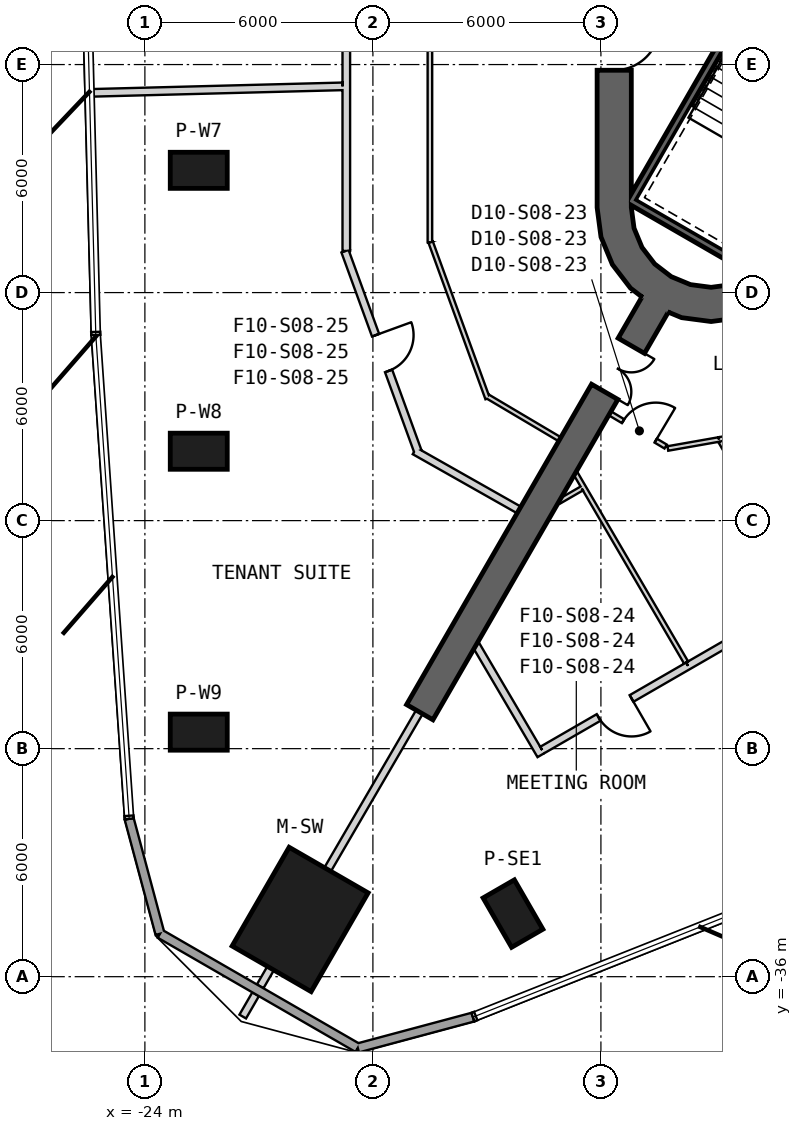
"""IFC4 building model, lengths in metres.
Left out: names, types, materials, properties, quantities, classifications, styles, units other than length and angle.
Written with IfcOpenShell. Run it as: python <this file> out.ifc"""

import sys

from ifc_helpers import new_model, si_unit, direction, frame, frame_2d, origin, origin_2d, place, context, subcontext, project, spatial, polyline, rectangle, outline, extrude, element, fill, save


model = new_model("IFC4")
c1 = context("Model", 3, precision=1e-05, world=origin(), true_north=direction((0.0, 1.0)))
c2 = subcontext(c1, "Body", "Model", "MODEL_VIEW")
j1 = project(units=[si_unit("LENGTHUNIT", "METRE"), si_unit("PLANEANGLEUNIT", "RADIAN")], contexts=[c1])
p1 = place(None, origin())
s1 = spatial("IfcSite", under=j1, at=p1, CompositionType="ELEMENT")
p2 = place(p1, origin())
s2 = spatial("IfcBuilding", under=s1, at=p2, CompositionType="ELEMENT")
p3 = place(p2, frame((0.0, 0.0, 143.9)))
s3 = spatial("IfcBuildingStorey", under=s2, at=p3, CompositionType="ELEMENT", Elevation=143.9)
p4 = place(p3, frame((-19.915, -34.494, 0.0), z_axis=(0.0, 0.0, 1.0), x_axis=(-0.5, -0.866025403784, 0.0)))
e1 = element("IfcColumn", 1, at=p4, inside=s3, PredefinedType="COLUMN", context=c2, shape_type="SweptSolid", body=[
    extrude(rectangle(XDim=3.0, YDim=2.4, at=origin_2d()), origin(), (0.0, 0.0, 1.0), 4.1),
])
for number, where, z_axis, x_axis in (
    (2, (-22.583, -14.783, 0.0), (0.0, 0.0, 1.0), (-1.0, 0.0, 0.0)),
    (3, (-22.583, -22.174, 0.0), (0.0, 0.0, 1.0), (-1.0, 0.0, 0.0)),
    (4, (-22.583, -29.566, 0.0), (0.0, 0.0, 1.0), (-1.0, 0.0, 0.0)),
    (5, (-14.313, -34.34, 0.0), (0.0, 0.0, 1.0), (0.5, -0.866, 0.0)),
):
    element("IfcColumn", number, at=place(p3, frame(where, z_axis=z_axis, x_axis=x_axis)), inside=s3, PredefinedType="COLUMN", context=c2, shape_type="SweptSolid", body=[
        extrude(rectangle(XDim=1.5, YDim=0.95, at=origin_2d()), origin(), (0.0, 0.0, 1.0), 4.1),
    ])
p5 = place(p3, frame((-11.65, 15.762, 0.0), z_axis=(0.0, 0.0, 1.0), x_axis=(0.0, -1.0, 0.0)))
e6 = element("IfcWall", 6, at=p5, inside=s3, PredefinedType="SHEAR", context=c2, shape_type="SweptSolid", body=[
    extrude(rectangle(XDim=31.523, YDim=0.9, at=frame_2d((15.762, 0.0))), origin(), (0.0, 0.0, 1.0), 4.1),
])
p6 = place(p5, frame((7.062, 0.0, 0.0)))
e7 = element("IfcOpeningElement", 7, at=p6, cuts=e6, PredefinedType="OPENING", context=c2, shape_type="SweptSolid", body=[
    extrude(rectangle(XDim=1.2, YDim=2.4, at=frame_2d((0.6, 1.2))), frame((0.0, 0.46, 0.0), z_axis=(0.0, -1.0, 0.0), x_axis=(1.0, 0.0, 0.0)), (0.0, 0.0, 1.0), 0.92),
])
p7 = place(p5, frame((9.762, 0.0, 0.0)))
e8 = element("IfcOpeningElement", 8, at=p7, cuts=e6, PredefinedType="OPENING", context=c2, shape_type="SweptSolid", body=[
    extrude(rectangle(XDim=1.2, YDim=2.4, at=frame_2d((0.6, 1.2))), frame((0.0, 0.46, 0.0), z_axis=(0.0, -1.0, 0.0), x_axis=(1.0, 0.0, 0.0)), (0.0, 0.0, 1.0), 0.92),
])
p8 = place(p5, frame((12.462, 0.0, 0.0)))
e9 = element("IfcOpeningElement", 9, at=p8, cuts=e6, PredefinedType="OPENING", context=c2, shape_type="SweptSolid", body=[
    extrude(rectangle(XDim=1.2, YDim=2.4, at=frame_2d((0.6, 1.2))), frame((0.0, 0.46, 0.0), z_axis=(0.0, -1.0, 0.0), x_axis=(1.0, 0.0, 0.0)), (0.0, 0.0, 1.0), 0.92),
])
p9 = place(p5, frame((15.162, 0.0, 0.0)))
e10 = element("IfcOpeningElement", 10, at=p9, cuts=e6, PredefinedType="OPENING", context=c2, shape_type="SweptSolid", body=[
    extrude(rectangle(XDim=1.2, YDim=2.4, at=frame_2d((0.6, 1.2))), frame((0.0, 0.46, 0.0), z_axis=(0.0, -1.0, 0.0), x_axis=(1.0, 0.0, 0.0)), (0.0, 0.0, 1.0), 0.92),
])
p10 = place(p5, frame((17.862, 0.0, 0.0)))
e11 = element("IfcOpeningElement", 11, at=p10, cuts=e6, PredefinedType="OPENING", context=c2, shape_type="SweptSolid", body=[
    extrude(rectangle(XDim=1.2, YDim=2.4, at=frame_2d((0.6, 1.2))), frame((0.0, 0.46, 0.0), z_axis=(0.0, -1.0, 0.0), x_axis=(1.0, 0.0, 0.0)), (0.0, 0.0, 1.0), 0.92),
])
p11 = place(p5, frame((20.562, 0.0, 0.0)))
e12 = element("IfcOpeningElement", 12, at=p11, cuts=e6, PredefinedType="OPENING", context=c2, shape_type="SweptSolid", body=[
    extrude(rectangle(XDim=1.2, YDim=2.4, at=frame_2d((0.6, 1.2))), frame((0.0, 0.46, 0.0), z_axis=(0.0, -1.0, 0.0), x_axis=(1.0, 0.0, 0.0)), (0.0, 0.0, 1.0), 0.92),
])
p12 = place(p5, frame((23.262, 0.0, 0.0)))
e13 = element("IfcOpeningElement", 13, at=p12, cuts=e6, PredefinedType="OPENING", context=c2, shape_type="SweptSolid", body=[
    extrude(rectangle(XDim=1.2, YDim=2.4, at=frame_2d((0.6, 1.2))), frame((0.0, 0.46, 0.0), z_axis=(0.0, -1.0, 0.0), x_axis=(1.0, 0.0, 0.0)), (0.0, 0.0, 1.0), 0.92),
])
p13 = place(p5, frame((3.612, 0.0, 0.0)))
e14 = element("IfcOpeningElement", 14, at=p13, cuts=e6, PredefinedType="OPENING", context=c2, shape_type="SweptSolid", body=[
    extrude(rectangle(XDim=1.2, YDim=2.4, at=frame_2d((0.6, 1.2))), frame((0.0, 0.46, 0.0), z_axis=(0.0, -1.0, 0.0), x_axis=(1.0, 0.0, 0.0)), (0.0, 0.0, 1.0), 0.92),
])
p14 = place(p5, frame((26.712, 0.0, 0.0)))
e15 = element("IfcOpeningElement", 15, at=p14, cuts=e6, PredefinedType="OPENING", context=c2, shape_type="SweptSolid", body=[
    extrude(rectangle(XDim=1.2, YDim=2.4, at=frame_2d((0.6, 1.2))), frame((0.0, 0.46, 0.0), z_axis=(0.0, -1.0, 0.0), x_axis=(1.0, 0.0, 0.0)), (0.0, 0.0, 1.0), 0.92),
])
p15 = place(p3, origin())
e16 = element("IfcWall", 16, at=p15, inside=s3, PredefinedType="SHEAR", context=c2, shape_type="SweptSolid", body=[
    extrude(outline(polyline([(-12.1, -15.762), (-11.998, -16.538), (-11.698, -17.262), (-11.221, -17.883), (-10.6, -18.36), (-9.876, -18.659), (-9.1, -18.762), (-8.323, -18.659), (-7.6, -18.36), (-8.05, -17.58), (-8.556, -17.79), (-9.1, -17.862), (-9.644, -17.79), (-10.15, -17.58), (-10.585, -17.247), (-10.919, -16.812), (-11.128, -16.305), (-11.2, -15.762), (-12.1, -15.762)])), origin(), (0.0, 0.0, 1.0), 4.1),
])
p16 = place(p3, frame((-10.575, -18.316, 0.0), z_axis=(0.0, 0.0, 1.0), x_axis=(-0.500002326941, -0.86602406032, 0.0)))
e17 = element("IfcWall", 17, at=p16, inside=s3, PredefinedType="SHEAR", context=c2, shape_type="SweptSolid", body=[
    extrude(rectangle(XDim=12.384, YDim=0.8, at=frame_2d((6.192, 0.0))), origin(), (0.0, 0.0, 1.0), 4.1),
])
p17 = place(p16, frame((1.25, 0.0, 0.0)))
e18 = element("IfcOpeningElement", 18, at=p17, cuts=e17, PredefinedType="OPENING", context=c2, shape_type="SweptSolid", body=[
    extrude(rectangle(XDim=1.4, YDim=2.4, at=frame_2d((0.7, 1.2))), frame((0.0, 0.41, 0.0), z_axis=(0.0, -1.0, 0.0), x_axis=(1.0, 0.0, 0.0)), (0.0, 0.0, 1.0), 0.82),
])
p18 = place(p3, frame((-24.414, -31.846, 0.0), z_axis=(0.0, 0.0, 1.0), x_axis=(0.258807521156, -0.965928914048, 0.0)))
e19 = element("IfcWall", 19, at=p18, inside=s3, PredefinedType="SOLIDWALL", context=c2, shape_type="SweptSolid", body=[
    extrude(rectangle(XDim=3.132, YDim=0.24, at=frame_2d((1.566, 0.0))), origin(), (0.0, 0.0, 1.0), 3.8),
])
p19 = place(p3, frame((-23.603, -34.871, 0.0), z_axis=(0.0, 0.0, 1.0), x_axis=(0.866037453254, -0.499979129126, 0.0)))
e20 = element("IfcWall", 20, at=p19, inside=s3, PredefinedType="SOLIDWALL", context=c2, shape_type="SweptSolid", body=[
    extrude(rectangle(XDim=6.01, YDim=0.24, at=frame_2d((3.005, 0.0))), origin(), (0.0, 0.0, 1.0), 3.8),
])
p20 = place(p3, frame((-18.398, -37.876, 0.0), z_axis=(0.0, 0.0, 1.0), x_axis=(0.965925466837, 0.258820386593, 0.0)))
e21 = element("IfcWall", 21, at=p20, inside=s3, PredefinedType="SOLIDWALL", context=c2, shape_type="SweptSolid", body=[
    extrude(rectangle(XDim=3.136, YDim=0.24, at=frame_2d((1.568, 0.0))), origin(), (0.0, 0.0, 1.0), 3.8),
])
p21 = place(p3, frame((-11.282, -15.541, -0.3), z_axis=(0.0, 0.0, 1.0), x_axis=(0.866000483506, -0.500043160704, 0.0)))
e22 = element("IfcWall", 22, at=p21, inside=s3, PredefinedType="SHEAR", context=c2, shape_type="SweptSolid", body=[
    extrude(rectangle(XDim=3.8, YDim=0.2, at=frame_2d((1.9, 0.0))), origin(), (0.0, 0.0, 1.0), 4.1),
])
p22 = place(p3, frame((-7.196, -8.663, -0.3), z_axis=(0.0, 0.0, 1.0), x_axis=(-0.499997992926, -0.866026562566, 0.0)))
e23 = element("IfcWall", 23, at=p22, inside=s3, PredefinedType="SHEAR", context=c2, shape_type="SweptSolid", body=[
    extrude(rectangle(XDim=7.9, YDim=0.2, at=frame_2d((3.95, 0.0))), origin(), (0.0, 0.0, 1.0), 4.1),
])
p23 = place(p3, frame((-16.5, 16.557, 0.0), z_axis=(0.0, 0.0, 1.0), x_axis=(0.0, -1.0, 0.0)))
e24 = element("IfcWall", 24, at=p23, inside=s3, PredefinedType="PARTITIONING", context=c2, shape_type="SweptSolid", body=[
    extrude(rectangle(XDim=33.234, YDim=0.12, at=frame_2d((16.617, 0.0))), origin(), (0.0, 0.0, 1.0), 2.98),
])
p24 = place(p23, frame((16.087, 0.0, 0.0)))
e25 = element("IfcOpeningElement", 25, at=p24, cuts=e24, PredefinedType="OPENING", context=c2, shape_type="SweptSolid", body=[
    extrude(rectangle(XDim=1.0, YDim=2.1, at=frame_2d((0.5, 1.05))), frame((0.0, 0.07, 0.0), z_axis=(0.0, -1.0, 0.0), x_axis=(1.0, 0.0, 0.0)), (0.0, 0.0, 1.0), 0.14),
])
p25 = place(p3, frame((-16.479, -16.673, 0.0), z_axis=(0.0, 0.0, 1.0), x_axis=(0.342025144217, -0.939690800595, 0.0)))
e26 = element("IfcWall", 26, at=p25, inside=s3, PredefinedType="PARTITIONING", context=c2, shape_type="SweptSolid", body=[
    extrude(rectangle(XDim=4.378, YDim=0.12, at=frame_2d((2.189, 0.0))), origin(), (0.0, 0.0, 1.0), 2.88),
])
p26 = place(p3, frame((-14.983, -20.732, 0.0), z_axis=(0.0, 0.0, 1.0), x_axis=(0.860268204019, -0.509841756973, 0.0)))
e27 = element("IfcWall", 27, at=p26, inside=s3, PredefinedType="PARTITIONING", context=c2, shape_type="SweptSolid", body=[
    extrude(rectangle(XDim=2.21, YDim=0.12, at=frame_2d((1.105, 0.0))), origin(), (0.0, 0.0, 1.0), 3.8),
])
p27 = place(p3, frame((-16.903, -22.166, 0.0), z_axis=(0.0, 0.0, 1.0), x_axis=(0.870335069356, -0.492460015686, 0.0)))
e28 = element("IfcWall", 28, at=p27, inside=s3, PredefinedType="PARTITIONING", context=c2, shape_type="SweptSolid", body=[
    extrude(rectangle(XDim=3.156, YDim=0.2, at=frame_2d((1.578, 0.0))), origin(), (0.0, 0.0, 1.0), 2.88),
])
p28 = place(p3, frame((-18.734, -16.911, 0.0), z_axis=(0.0, 0.0, 1.0), x_axis=(0.342022840992, -0.939691638911, 0.0)))
e29 = element("IfcWall", 29, at=p28, inside=s3, PredefinedType="PARTITIONING", context=c2, shape_type="SweptSolid", body=[
    extrude(rectangle(XDim=5.605, YDim=0.2, at=frame_2d((2.802, 0.0))), origin(), (0.0, 0.0, 1.0), 2.88),
])
p29 = place(p28, frame((2.352, 0.0, 0.0)))
e30 = element("IfcOpeningElement", 30, at=p29, cuts=e29, PredefinedType="OPENING", context=c2, shape_type="SweptSolid", body=[
    extrude(rectangle(XDim=1.0, YDim=2.1, at=frame_2d((0.5, 1.05))), frame((0.0, 0.11, 0.0), z_axis=(0.0, -1.0, 0.0), x_axis=(1.0, 0.0, 0.0)), (0.0, 0.0, 1.0), 0.22),
])
p30 = place(p3, frame((-18.7, 10.13, 0.0), z_axis=(0.0, 0.0, 1.0), x_axis=(0.0, -1.0, 0.0)))
e31 = element("IfcWall", 31, at=p30, inside=s3, PredefinedType="PARTITIONING", context=c2, shape_type="SweptSolid", body=[
    extrude(rectangle(XDim=27.035, YDim=0.2, at=frame_2d((13.517, 0.0))), origin(), (0.0, 0.0, 1.0), 3.08),
])
p31 = place(p30, frame((10.85, 0.0, 0.0)))
e32 = element("IfcOpeningElement", 32, at=p31, cuts=e31, PredefinedType="OPENING", context=c2, shape_type="SweptSolid", body=[
    extrude(rectangle(XDim=1.0, YDim=2.1, at=frame_2d((0.5, 1.05))), frame((0.0, 0.11, 0.0), z_axis=(0.0, -1.0, 0.0), x_axis=(1.0, 0.0, 0.0)), (0.0, 0.0, 1.0), 0.22),
])
p32 = place(p3, frame((-10.239, -22.102, 0.0), z_axis=(0.0, 0.0, 1.0), x_axis=(0.984801523662, 0.173683502361, 0.0)))
e33 = element("IfcWall", 33, at=p32, inside=s3, PredefinedType="PARTITIONING", context=c2, shape_type="SweptSolid", body=[
    extrude(rectangle(XDim=1.368, YDim=0.12, at=frame_2d((0.684, 0.0))), origin(), (0.0, 0.0, 1.0), 2.88),
])
p33 = place(p3, frame((-8.892, -21.865, 0.0), z_axis=(0.0, 0.0, 1.0), x_axis=(0.984802696179, 0.17367685395, 0.0)))
e34 = element("IfcWall", 34, at=p33, inside=s3, PredefinedType="PARTITIONING", context=c2, shape_type="SweptSolid", body=[
    extrude(rectangle(XDim=2.311, YDim=0.12, at=frame_2d((1.156, 0.0))), origin(), (0.0, 0.0, 1.0), 3.8),
])
p34 = place(p33, frame((0.706, 0.0, 0.0)))
e35 = element("IfcOpeningElement", 35, at=p34, cuts=e34, PredefinedType="OPENING", context=c2, shape_type="SweptSolid", body=[
    extrude(rectangle(XDim=0.9, YDim=2.1, at=frame_2d((0.45, 1.05))), frame((0.0, 0.07, 0.0), z_axis=(0.0, -1.0, 0.0), x_axis=(1.0, 0.0, 0.0)), (0.0, 0.0, 1.0), 0.14),
])
p35 = place(p3, frame((-11.764, -21.177, 0.0), z_axis=(0.0, 0.0, 1.0), x_axis=(0.859089516353, -0.511825363667, 0.0)))
e36 = element("IfcWall", 36, at=p35, inside=s3, PredefinedType="PARTITIONING", context=c2, shape_type="SweptSolid", body=[
    extrude(rectangle(XDim=1.709, YDim=0.12, at=frame_2d((0.854, 0.0))), origin(), (0.0, 0.0, 1.0), 3.8),
])
p36 = place(p35, frame((0.405, 0.0, 0.0)))
e37 = element("IfcOpeningElement", 37, at=p36, cuts=e36, PredefinedType="OPENING", context=c2, shape_type="SweptSolid", body=[
    extrude(rectangle(XDim=1.0, YDim=2.1, at=frame_2d((0.5, 1.05))), frame((0.0, 0.07, 0.0), z_axis=(0.0, -1.0, 0.0), x_axis=(1.0, 0.0, 0.0)), (0.0, 0.0, 1.0), 0.14),
])
p37 = place(p3, frame((-25.457, -12.746, 0.0), z_axis=(0.0, 0.0, 1.0), x_axis=(0.999663993994, 0.025921016788, 0.0)))
e38 = element("IfcWall", 38, at=p37, inside=s3, PredefinedType="PARTITIONING", context=c2, shape_type="SweptSolid", body=[
    extrude(rectangle(XDim=6.659, YDim=0.2, at=frame_2d((3.33, 0.0))), origin(), (0.0, 0.0, 1.0), 3.08),
])
p38 = place(p3, frame((-20.691, -35.778, 0.0), z_axis=(0.0, 0.0, 1.0), x_axis=(-0.500004084281, -0.866023045711, 0.0)))
e39 = element("IfcWall", 39, at=p38, inside=s3, PredefinedType="PARTITIONING", context=c2, shape_type="SweptSolid", body=[
    extrude(rectangle(XDim=0.55, YDim=0.2, at=frame_2d((0.275, 0.0))), origin(), (0.0, 0.0, 1.0), 3.8),
])
p39 = place(p3, frame((-21.086, -36.463, 0.0), z_axis=(0.0, 0.0, 1.0), x_axis=(-0.499784885981, -0.866149564305, 0.0)))
e40 = element("IfcWall", 40, at=p39, inside=s3, PredefinedType="PARTITIONING", context=c2, shape_type="SweptSolid", body=[
    extrude(rectangle(XDim=0.677, YDim=0.2, at=frame_2d((0.338, 0.0))), origin(), (0.0, 0.0, 1.0), 3.8),
])
p40 = place(p3, frame((-16.776, -29.036, 0.0), z_axis=(0.0, 0.0, 1.0), x_axis=(-0.503548187655, -0.863967142147, 0.0)))
e41 = element("IfcWall", 41, at=p40, inside=s3, PredefinedType="PARTITIONING", context=c2, shape_type="SweptSolid", body=[
    extrude(rectangle(XDim=4.797, YDim=0.2, at=frame_2d((2.398, 0.0))), origin(), (0.0, 0.0, 1.0), 3.37),
])
p41 = place(p3, frame((-6.509, -25.974, 0.0), z_axis=(0.0, 0.0, 1.0), x_axis=(-0.86602156466, -0.500006649499, 0.0)))
e42 = element("IfcWall", 42, at=p41, inside=s3, PredefinedType="PARTITIONING", context=c2, shape_type="SweptSolid", body=[
    extrude(rectangle(XDim=3.693, YDim=0.2, at=frame_2d((1.847, 0.0))), origin(), (0.0, 0.0, 1.0), 2.98),
])
p42 = place(p3, frame((-9.707, -27.821, 0.0), z_axis=(0.0, 0.0, 1.0), x_axis=(-0.866031500321, -0.49998944034, 0.0)))
e43 = element("IfcWall", 43, at=p42, inside=s3, PredefinedType="PARTITIONING", context=c2, shape_type="SweptSolid", body=[
    extrude(rectangle(XDim=4.433, YDim=0.2, at=frame_2d((2.216, 0.0))), origin(), (0.0, 0.0, 1.0), 2.88),
])
p43 = place(p42, frame((1.716, 0.0, 0.0)))
e44 = element("IfcOpeningElement", 44, at=p43, cuts=e43, PredefinedType="OPENING", context=c2, shape_type="SweptSolid", body=[
    extrude(rectangle(XDim=1.0, YDim=2.1, at=frame_2d((0.5, 1.05))), frame((0.0, 0.11, 0.0), z_axis=(0.0, -1.0, 0.0), x_axis=(1.0, 0.0, 0.0)), (0.0, 0.0, 1.0), 0.22),
])
p44 = place(p3, frame((-15.286, -27.276, 0.0), z_axis=(0.0, 0.0, 1.0), x_axis=(0.506988383663, -0.861952886666, 0.0)))
e45 = element("IfcWall", 45, at=p44, inside=s3, PredefinedType="PARTITIONING", context=c2, shape_type="SweptSolid", body=[
    extrude(rectangle(XDim=3.361, YDim=0.2, at=frame_2d((1.681, 0.0))), origin(), (0.0, 0.0, 1.0), 3.8),
])
p45 = place(p3, frame((-6.559, -25.888, 0.0), z_axis=(0.0, 0.0, 1.0), x_axis=(-0.499994486038, 0.866028587248, 0.0)))
e46 = element("IfcWall", 46, at=p45, inside=s3, PredefinedType="PARTITIONING", context=c2, shape_type="SweptSolid", body=[
    extrude(rectangle(XDim=4.583, YDim=0.12, at=frame_2d((2.292, 0.0))), origin(), (0.0, 0.0, 1.0), 2.98),
])
p46 = place(p3, frame((-12.673, -22.75, 0.0), z_axis=(0.0, 0.0, 1.0), x_axis=(0.504751362892, -0.863264769152, 0.0)))
e47 = element("IfcWall", 47, at=p46, inside=s3, PredefinedType="PARTITIONING", context=c2, shape_type="SweptSolid", body=[
    extrude(rectangle(XDim=5.775, YDim=0.12, at=frame_2d((2.887, 0.0))), origin(), (0.0, 0.0, 1.0), 2.88),
])
p47 = place(p3, frame((-12.505, -23.155, 0.0), z_axis=(0.0, 0.0, 1.0), x_axis=(-0.866138803259, -0.49980353489, 0.0)))
e48 = element("IfcWall", 48, at=p47, inside=s3, PredefinedType="PARTITIONING", context=c2, shape_type="SweptSolid", body=[
    extrude(rectangle(XDim=0.695, YDim=0.12, at=frame_2d((0.348, 0.0))), origin(), (0.0, 0.0, 1.0), 3.8),
])
p48 = place(p36, origin())
e49 = element("IfcDoor", 49, at=p48, inside=s3, OperationType="SINGLE_SWING_LEFT", PredefinedType="NOTDEFINED", context=c2, shape_type="SweptSolid", body=[
    extrude(rectangle(XDim=1.0, YDim=2.1, at=frame_2d((0.5, 1.05))), frame((0.0, 0.025, 0.0), z_axis=(0.0, -1.0, 0.0), x_axis=(1.0, 0.0, 0.0)), (0.0, 0.0, 1.0), 0.05),
])
fill(e37, e49)
p49 = place(p43, origin())
e50 = element("IfcDoor", 50, at=p49, inside=s3, OperationType="SINGLE_SWING_LEFT", PredefinedType="USERDEFINED", context=c2, shape_type="SweptSolid", body=[
    extrude(rectangle(XDim=1.0, YDim=2.1, at=frame_2d((0.5, 1.05))), frame((0.0, 0.025, 0.0), z_axis=(0.0, -1.0, 0.0), x_axis=(1.0, 0.0, 0.0)), (0.0, 0.0, 1.0), 0.05),
])
fill(e44, e50)
p50 = place(p29, origin())
e51 = element("IfcDoor", 51, at=p50, inside=s3, OperationType="SINGLE_SWING_RIGHT", PredefinedType="USERDEFINED", context=c2, shape_type="SweptSolid", body=[
    extrude(rectangle(XDim=1.0, YDim=2.1, at=frame_2d((0.5, 1.05))), frame((0.0, 0.025, 0.0), z_axis=(0.0, -1.0, 0.0), x_axis=(1.0, 0.0, 0.0)), (0.0, 0.0, 1.0), 0.05),
])
fill(e30, e51)
p51 = place(p14, origin())
e52 = element("IfcDoor", 52, at=p51, inside=s3, OperationType="SINGLE_SWING_RIGHT", PredefinedType="USERDEFINED", context=c2, shape_type="SweptSolid", body=[
    extrude(rectangle(XDim=1.2, YDim=2.4, at=frame_2d((0.6, 1.2))), frame((0.0, 0.025, 0.0), z_axis=(0.0, -1.0, 0.0), x_axis=(1.0, 0.0, 0.0)), (0.0, 0.0, 1.0), 0.05),
])
fill(e15, e52)
p52 = place(p17, origin())
e53 = element("IfcDoor", 53, at=p52, inside=s3, OperationType="DOUBLE_DOOR_SINGLE_SWING", PredefinedType="NOTDEFINED", context=c2, shape_type="SweptSolid", body=[
    extrude(rectangle(XDim=1.4, YDim=2.4, at=frame_2d((0.7, 1.2))), frame((0.0, 0.025, 0.0), z_axis=(0.0, -1.0, 0.0), x_axis=(1.0, 0.0, 0.0)), (0.0, 0.0, 1.0), 0.05),
])
fill(e18, e53)
save(model, sys.argv[1])
